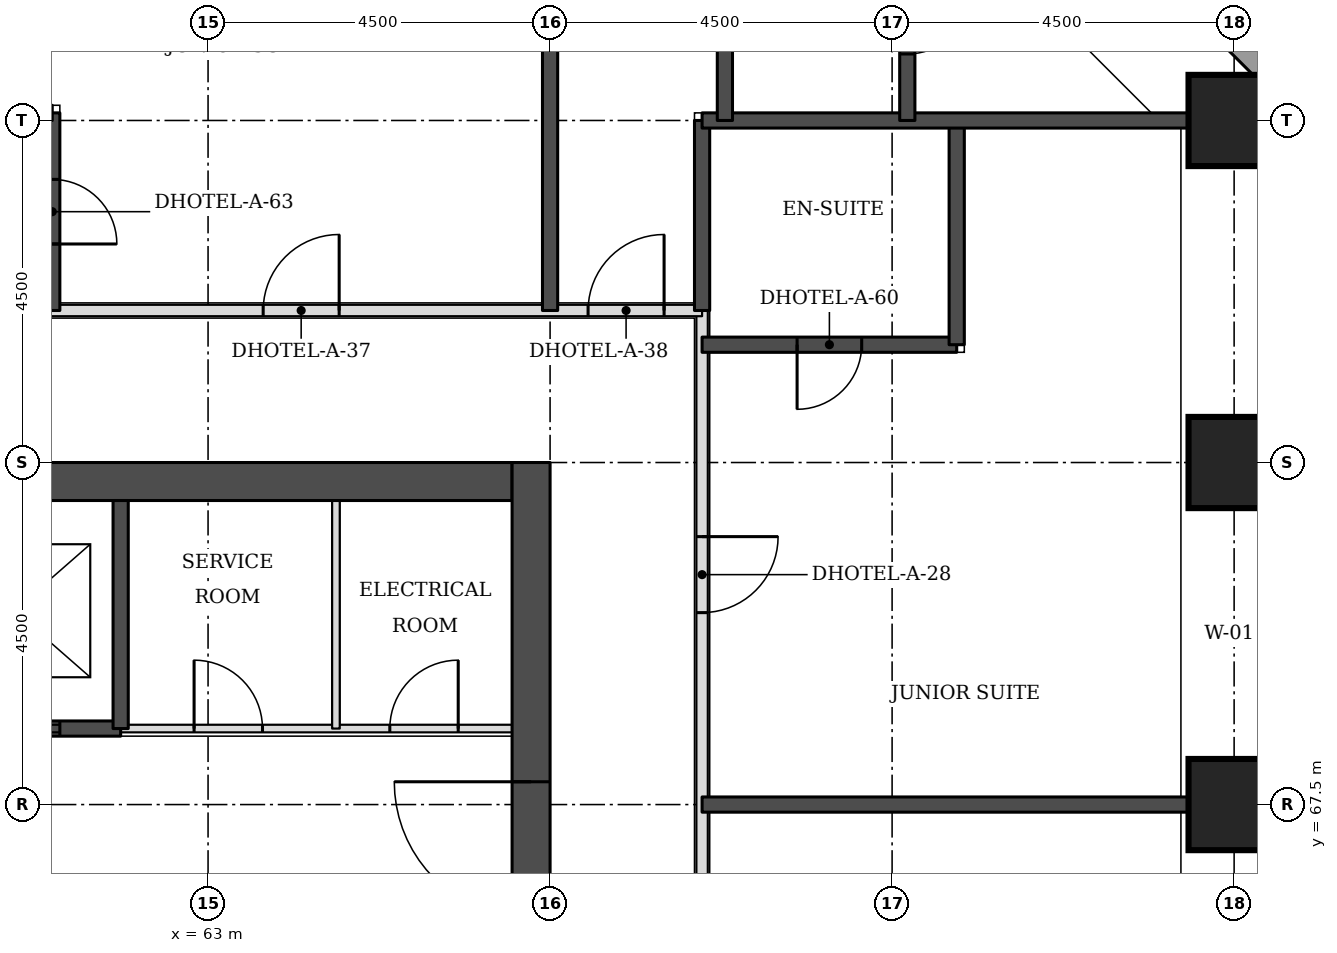
"""IFC4 building model, lengths in metres.
Left out: names, types, materials, properties, quantities, classifications, styles, units other than length and angle.
Written with IfcOpenShell. Run it as: python <this file> out.ifc"""

import sys

from ifc_helpers import new_model, si_unit, direction, frame, frame_2d, origin, origin_2d, place, context, subcontext, project, spatial, rectangle, extrude, element, fill, save


model = new_model("IFC4")
c1 = context("Model", 3, precision=1e-05, world=origin(), true_north=direction((0.0, 1.0)))
c2 = subcontext(c1, "Body", "Model", "MODEL_VIEW")
j1 = project(units=[si_unit("LENGTHUNIT", "METRE"), si_unit("PLANEANGLEUNIT", "RADIAN")], contexts=[c1])
p1 = place(None, origin())
s1 = spatial("IfcSite", under=j1, at=p1, CompositionType="ELEMENT")
p2 = place(p1, origin())
s2 = spatial("IfcBuilding", under=s1, at=p2, CompositionType="ELEMENT")
p3 = place(p2, frame((0.0, 0.0, 26.4)))
s3 = spatial("IfcBuildingStorey", under=s2, at=p3, CompositionType="ELEMENT", Elevation=26.4)
for number, where, z_axis, x_axis in (
    (1, (76.5, 67.5, 0.0), (0.0, 0.0, 1.0), (1.0, 0.0, 0.0)),
    (2, (76.5, 72.0, 0.0), (0.0, 0.0, 1.0), (1.0, 0.0, 0.0)),
    (3, (76.5, 76.5, 0.0), (0.0, 0.0, 1.0), (1.0, 0.0, 0.0)),
):
    element("IfcColumn", number, at=place(p3, frame(where, z_axis=z_axis, x_axis=x_axis)), inside=s3, PredefinedType="COLUMN", context=c2, shape_type="SweptSolid", body=[
        extrude(rectangle(XDim=1.2, YDim=1.2, at=origin_2d()), origin(), (0.0, 0.0, 1.0), 3.3),
    ])
p4 = place(p3, frame((45.5, 71.75, 0.0), z_axis=(0.0, 0.0, 1.0), x_axis=(1.0, 0.0, 0.0)))
e4 = element("IfcWall", 4, at=p4, inside=s3, PredefinedType="SHEAR", context=c2, shape_type="SweptSolid", body=[
    extrude(rectangle(XDim=21.5, YDim=0.5, at=frame_2d((10.75, 0.0))), origin(), (0.0, 0.0, 1.0), 3.3),
])
p5 = place(p3, frame((67.25, 49.5, 0.0), z_axis=(0.0, 0.0, 1.0), x_axis=(0.0, 1.0, 0.0)))
e5 = element("IfcWall", 5, at=p5, inside=s3, PredefinedType="SHEAR", context=c2, shape_type="SweptSolid", body=[
    extrude(rectangle(XDim=22.5, YDim=0.5, at=frame_2d((11.25, 0.0))), origin(), (0.0, 0.0, 1.0), 3.3),
])
p6 = place(p5, frame((4.2, 0.0, 0.0)))
e6 = element("IfcOpeningElement", 6, at=p6, cuts=e5, PredefinedType="OPENING", context=c2, shape_type="SweptSolid", body=[
    extrude(rectangle(XDim=1.8, YDim=2.1, at=frame_2d((0.9, 1.05))), frame((0.0, 0.26, 0.0), z_axis=(0.0, -1.0, 0.0), x_axis=(1.0, 0.0, 0.0)), (0.0, 0.0, 1.0), 0.52),
])
p7 = place(p5, frame((6.9, 0.0, 0.0)))
e7 = element("IfcOpeningElement", 7, at=p7, cuts=e5, PredefinedType="OPENING", context=c2, shape_type="SweptSolid", body=[
    extrude(rectangle(XDim=1.1, YDim=2.1, at=frame_2d((0.55, 1.05))), frame((0.0, 0.26, 0.0), z_axis=(0.0, -1.0, 0.0), x_axis=(1.0, 0.0, 0.0)), (0.0, 0.0, 1.0), 0.52),
])
p8 = place(p5, frame((13.6, 0.0, 0.0)))
e8 = element("IfcOpeningElement", 8, at=p8, cuts=e5, PredefinedType="OPENING", context=c2, shape_type="SweptSolid", body=[
    extrude(rectangle(XDim=1.1, YDim=2.1, at=frame_2d((0.55, 1.05))), frame((0.0, 0.26, 0.0), z_axis=(0.0, -1.0, 0.0), x_axis=(1.0, 0.0, 0.0)), (0.0, 0.0, 1.0), 0.52),
])
p9 = place(p5, frame((16.5, 0.0, 0.0)))
e9 = element("IfcOpeningElement", 9, at=p9, cuts=e5, PredefinedType="OPENING", context=c2, shape_type="SweptSolid", body=[
    extrude(rectangle(XDim=1.8, YDim=2.1, at=frame_2d((0.9, 1.05))), frame((0.0, 0.26, 0.0), z_axis=(0.0, -1.0, 0.0), x_axis=(1.0, 0.0, 0.0)), (0.0, 0.0, 1.0), 0.52),
])
p10 = place(p3, frame((77.326, 76.77, 0.0), z_axis=(0.0, 0.0, 1.0), x_axis=(-0.707106781187, 0.707106781187, 0.0)))
e10 = element("IfcWall", 10, at=p10, inside=s3, PredefinedType="STANDARD", context=c2, shape_type="SweptSolid", body=[
    extrude(rectangle(XDim=7.151, YDim=0.35, at=frame_2d((3.576, 0.0))), origin(), (0.0, 0.0, 1.0), 3.055),
])
p11 = place(p10, frame((1.926, 0.0, 0.8)))
e11 = element("IfcOpeningElement", 11, at=p11, cuts=e10, PredefinedType="OPENING", context=c2, shape_type="SweptSolid", body=[
    extrude(rectangle(XDim=3.3, YDim=1.5, at=frame_2d((1.65, 0.75))), frame((0.0, 0.185, 0.0), z_axis=(0.0, -1.0, 0.0), x_axis=(1.0, 0.0, 0.0)), (0.0, 0.0, 1.0), 0.37),
])
p12 = place(p3, frame((69.5, 47.5, 0.0), z_axis=(0.0, 0.0, 1.0), x_axis=(0.0, 1.0, 0.0)))
e12 = element("IfcWall", 12, at=p12, inside=s3, PredefinedType="PARTITIONING", context=c2, shape_type="SweptSolid", body=[
    extrude(rectangle(XDim=26.5, YDim=0.15, at=frame_2d((13.25, 0.0))), origin(), (0.0, 0.0, 1.0), 3.08),
])
p13 = place(p12, frame((22.525, 0.0, 0.0)))
e13 = element("IfcOpeningElement", 13, at=p13, cuts=e12, PredefinedType="OPENING", context=c2, shape_type="SweptSolid", body=[
    extrude(rectangle(XDim=1.0, YDim=2.1, at=frame_2d((0.5, 1.05))), frame((0.0, 0.085, 0.0), z_axis=(0.0, -1.0, 0.0), x_axis=(1.0, 0.0, 0.0)), (0.0, 0.0, 1.0), 0.17),
])
p14 = place(p12, frame((16.225, 0.0, 0.0)))
e14 = element("IfcOpeningElement", 14, at=p14, cuts=e12, PredefinedType="OPENING", context=c2, shape_type="SweptSolid", body=[
    extrude(rectangle(XDim=1.0, YDim=2.1, at=frame_2d((0.5, 1.05))), frame((0.0, 0.085, 0.0), z_axis=(0.0, -1.0, 0.0), x_axis=(1.0, 0.0, 0.0)), (0.0, 0.0, 1.0), 0.17),
])
p15 = place(p12, frame((4.25, 0.0, 0.0)))
e15 = element("IfcOpeningElement", 15, at=p15, cuts=e12, PredefinedType="OPENING", context=c2, shape_type="SweptSolid", body=[
    extrude(rectangle(XDim=1.1, YDim=2.1, at=frame_2d((0.55, 1.05))), frame((0.0, 0.085, 0.0), z_axis=(0.0, -1.0, 0.0), x_axis=(1.0, 0.0, 0.0)), (0.0, 0.0, 1.0), 0.17),
])
p16 = place(p12, frame((0.447, 0.0, 0.0)))
e16 = element("IfcOpeningElement", 16, at=p16, cuts=e12, PredefinedType="OPENING", context=c2, shape_type="SweptSolid", body=[
    extrude(rectangle(XDim=1.0, YDim=2.1, at=frame_2d((0.5, 1.05))), frame((0.0, 0.085, 0.0), z_axis=(0.0, -1.0, 0.0), x_axis=(1.0, 0.0, 0.0)), (0.0, 0.0, 1.0), 0.17),
])
p17 = place(p3, frame((43.0, 74.0, 0.0), z_axis=(0.0, 0.0, 1.0), x_axis=(1.0, 0.0, 0.0)))
e17 = element("IfcWall", 17, at=p17, inside=s3, PredefinedType="PARTITIONING", context=c2, shape_type="SweptSolid", body=[
    extrude(rectangle(XDim=26.5, YDim=0.15, at=frame_2d((13.25, 0.0))), origin(), (0.0, 0.0, 1.0), 3.08),
])
p18 = place(p17, frame((4.675, 0.0, 0.0)))
e18 = element("IfcOpeningElement", 18, at=p18, cuts=e17, PredefinedType="OPENING", context=c2, shape_type="SweptSolid", body=[
    extrude(rectangle(XDim=1.0, YDim=2.1, at=frame_2d((0.5, 1.05))), frame((0.0, 0.085, 0.0), z_axis=(0.0, -1.0, 0.0), x_axis=(1.0, 0.0, 0.0)), (0.0, 0.0, 1.0), 0.17),
])
p19 = place(p17, frame((9.025, 0.0, 0.0)))
e19 = element("IfcOpeningElement", 19, at=p19, cuts=e17, PredefinedType="OPENING", context=c2, shape_type="SweptSolid", body=[
    extrude(rectangle(XDim=1.0, YDim=2.1, at=frame_2d((0.5, 1.05))), frame((0.0, 0.085, 0.0), z_axis=(0.0, -1.0, 0.0), x_axis=(1.0, 0.0, 0.0)), (0.0, 0.0, 1.0), 0.17),
])
p20 = place(p17, frame((20.725, 0.0, 0.0)))
e20 = element("IfcOpeningElement", 20, at=p20, cuts=e17, PredefinedType="OPENING", context=c2, shape_type="SweptSolid", body=[
    extrude(rectangle(XDim=1.0, YDim=2.1, at=frame_2d((0.5, 1.05))), frame((0.0, 0.085, 0.0), z_axis=(0.0, -1.0, 0.0), x_axis=(1.0, 0.0, 0.0)), (0.0, 0.0, 1.0), 0.17),
])
p21 = place(p17, frame((0.5, 0.0, 0.0)))
e21 = element("IfcOpeningElement", 21, at=p21, cuts=e17, PredefinedType="OPENING", context=c2, shape_type="SweptSolid", body=[
    extrude(rectangle(XDim=1.0, YDim=2.1, at=frame_2d((0.5, 1.05))), frame((0.0, 0.085, 0.0), z_axis=(0.0, -1.0, 0.0), x_axis=(1.0, 0.0, 0.0)), (0.0, 0.0, 1.0), 0.17),
])
p22 = place(p17, frame((25.0, 0.0, 0.0)))
e22 = element("IfcOpeningElement", 22, at=p22, cuts=e17, PredefinedType="OPENING", context=c2, shape_type="SweptSolid", body=[
    extrude(rectangle(XDim=1.0, YDim=2.1, at=frame_2d((0.5, 1.05))), frame((0.0, 0.085, 0.0), z_axis=(0.0, -1.0, 0.0), x_axis=(1.0, 0.0, 0.0)), (0.0, 0.0, 1.0), 0.17),
])
p23 = place(p3, frame((69.5, 67.5, 0.0), z_axis=(0.0, 0.0, 1.0), x_axis=(1.0, 0.0, 0.0)))
e23 = element("IfcWall", 23, at=p23, inside=s3, PredefinedType="SOLIDWALL", context=c2, shape_type="SweptSolid", body=[
    extrude(rectangle(XDim=6.4, YDim=0.2, at=frame_2d((3.2, 0.0))), origin(), (0.0, 0.0, 1.0), 3.08),
])
p24 = place(p3, frame((69.5, 73.55, 0.0), z_axis=(0.0, 0.0, 1.0), x_axis=(1.0, 0.0, 0.0)))
e24 = element("IfcWall", 24, at=p24, inside=s3, PredefinedType="SOLIDWALL", context=c2, shape_type="SweptSolid", body=[
    extrude(rectangle(XDim=3.35, YDim=0.2, at=frame_2d((1.675, 0.0))), origin(), (0.0, 0.0, 1.0), 3.08),
])
p25 = place(p24, frame((1.25, 0.0, 0.0)))
e25 = element("IfcOpeningElement", 25, at=p25, cuts=e24, PredefinedType="OPENING", context=c2, shape_type="SweptSolid", body=[
    extrude(rectangle(XDim=0.85, YDim=2.1, at=frame_2d((0.425, 1.05))), frame((0.0, 0.11, 0.0), z_axis=(0.0, -1.0, 0.0), x_axis=(1.0, 0.0, 0.0)), (0.0, 0.0, 1.0), 0.22),
])
p26 = place(p3, frame((72.85, 73.55, 0.0), z_axis=(0.0, 0.0, 1.0), x_axis=(0.0, 1.0, 0.0)))
e26 = element("IfcWall", 26, at=p26, inside=s3, PredefinedType="SOLIDWALL", context=c2, shape_type="SweptSolid", body=[
    extrude(rectangle(XDim=2.95, YDim=0.2, at=frame_2d((1.475, 0.0))), origin(), (0.0, 0.0, 1.0), 3.08),
])
p27 = place(p3, frame((60.95, 74.0, 0.0), z_axis=(0.0, 0.0, 1.0), x_axis=(0.0, 1.0, 0.0)))
e27 = element("IfcWall", 27, at=p27, inside=s3, PredefinedType="SOLIDWALL", context=c2, shape_type="SweptSolid", body=[
    extrude(rectangle(XDim=2.6, YDim=0.2, at=frame_2d((1.3, 0.0))), origin(), (0.0, 0.0, 1.0), 3.08),
])
p28 = place(p27, frame((0.875, 0.0, 0.0)))
e28 = element("IfcOpeningElement", 28, at=p28, cuts=e27, PredefinedType="OPENING", context=c2, shape_type="SweptSolid", body=[
    extrude(rectangle(XDim=0.85, YDim=2.1, at=frame_2d((0.425, 1.05))), frame((0.0, 0.11, 0.0), z_axis=(0.0, -1.0, 0.0), x_axis=(1.0, 0.0, 0.0)), (0.0, 0.0, 1.0), 0.22),
])
p29 = place(p3, frame((67.5, 74.0, 0.0), z_axis=(0.0, 0.0, 1.0), x_axis=(0.0, 1.0, 0.0)))
e29 = element("IfcWall", 29, at=p29, inside=s3, PredefinedType="SOLIDWALL", context=c2, shape_type="SweptSolid", body=[
    extrude(rectangle(XDim=6.4, YDim=0.2, at=frame_2d((3.2, 0.0))), origin(), (0.0, 0.0, 1.0), 3.08),
])
p30 = place(p3, frame((69.5, 74.0, 0.0), z_axis=(0.0, 0.0, 1.0), x_axis=(0.0, 1.0, 0.0)))
e30 = element("IfcWall", 30, at=p30, inside=s3, PredefinedType="SOLIDWALL", context=c2, shape_type="SweptSolid", body=[
    extrude(rectangle(XDim=2.5, YDim=0.2, at=frame_2d((1.25, 0.0))), origin(), (0.0, 0.0, 1.0), 3.08),
])
p31 = place(p3, frame((69.5, 76.5, 0.0), z_axis=(0.0, 0.0, 1.0), x_axis=(1.0, 0.0, 0.0)))
e31 = element("IfcWall", 31, at=p31, inside=s3, PredefinedType="SOLIDWALL", context=c2, shape_type="SweptSolid", body=[
    extrude(rectangle(XDim=6.4, YDim=0.2, at=frame_2d((3.2, 0.0))), origin(), (0.0, 0.0, 1.0), 3.08),
])
p32 = place(p3, frame((69.8, 76.5, 0.0), z_axis=(0.0, 0.0, 1.0), x_axis=(0.0, 1.0, 0.0)))
e32 = element("IfcWall", 32, at=p32, inside=s3, PredefinedType="SOLIDWALL", context=c2, shape_type="SweptSolid", body=[
    extrude(rectangle(XDim=2.5, YDim=0.2, at=frame_2d((1.25, 0.0))), origin(), (0.0, 0.0, 1.0), 3.08),
])
p33 = place(p3, frame((72.2, 76.5, 0.0), z_axis=(0.0, 0.0, 1.0), x_axis=(0.0, 1.0, 0.0)))
e33 = element("IfcWall", 33, at=p33, inside=s3, PredefinedType="SOLIDWALL", context=c2, shape_type="SweptSolid", body=[
    extrude(rectangle(XDim=2.5, YDim=0.2, at=frame_2d((1.25, 0.0))), origin(), (0.0, 0.0, 1.0), 3.08),
])
p34 = place(p33, frame((0.875, 0.0, 0.0)))
e34 = element("IfcOpeningElement", 34, at=p34, cuts=e33, PredefinedType="OPENING", context=c2, shape_type="SweptSolid", body=[
    extrude(rectangle(XDim=0.85, YDim=2.1, at=frame_2d((0.425, 1.05))), frame((0.0, 0.11, 0.0), z_axis=(0.0, -1.0, 0.0), x_axis=(1.0, 0.0, 0.0)), (0.0, 0.0, 1.0), 0.22),
])
p35 = place(p3, frame((58.5, 76.6, 0.0), z_axis=(0.0, 0.0, 1.0), x_axis=(1.0, 0.0, 0.0)))
e35 = element("IfcWall", 35, at=p35, inside=s3, PredefinedType="SOLIDWALL", context=c2, shape_type="SweptSolid", body=[
    extrude(rectangle(XDim=2.45, YDim=0.2, at=frame_2d((1.225, 0.0))), origin(), (0.0, 0.0, 1.0), 3.08),
])
p36 = place(p3, frame((61.85, 68.5, 0.0), z_axis=(0.0, 0.0, 1.0), x_axis=(1.0, 0.0, 0.0)))
e36 = element("IfcWall", 36, at=p36, inside=s3, PredefinedType="PARTITIONING", context=c2, shape_type="SweptSolid", body=[
    extrude(rectangle(XDim=5.15, YDim=0.1, at=frame_2d((2.575, 0.0))), origin(), (0.0, 0.0, 1.0), 3.08),
])
p37 = place(p36, frame((3.541, 0.0, 0.0)))
e37 = element("IfcOpeningElement", 37, at=p37, cuts=e36, PredefinedType="OPENING", context=c2, shape_type="SweptSolid", body=[
    extrude(rectangle(XDim=0.9, YDim=2.1, at=frame_2d((0.45, 1.05))), frame((0.0, 0.06, 0.0), z_axis=(0.0, -1.0, 0.0), x_axis=(1.0, 0.0, 0.0)), (0.0, 0.0, 1.0), 0.12),
])
p38 = place(p36, frame((0.966, 0.0, 0.0)))
e38 = element("IfcOpeningElement", 38, at=p38, cuts=e36, PredefinedType="OPENING", context=c2, shape_type="SweptSolid", body=[
    extrude(rectangle(XDim=0.9, YDim=2.1, at=frame_2d((0.45, 1.05))), frame((0.0, 0.06, 0.0), z_axis=(0.0, -1.0, 0.0), x_axis=(1.0, 0.0, 0.0)), (0.0, 0.0, 1.0), 0.12),
])
p39 = place(p3, frame((50.65, 68.5, 0.0), z_axis=(0.0, 0.0, 1.0), x_axis=(1.0, 0.0, 0.0)))
e39 = element("IfcWall", 39, at=p39, inside=s3, PredefinedType="SOLIDWALL", context=c2, shape_type="SweptSolid", body=[
    extrude(rectangle(XDim=11.2, YDim=0.2, at=frame_2d((5.6, 0.0))), origin(), (0.0, 0.0, 1.0), 3.08),
])
p40 = place(p39, frame((0.8, 0.0, 0.0)))
e40 = element("IfcOpeningElement", 40, at=p40, cuts=e39, PredefinedType="OPENING", context=c2, shape_type="SweptSolid", body=[
    extrude(rectangle(XDim=1.2, YDim=2.1, at=frame_2d((0.6, 1.05))), frame((0.0, 0.11, 0.0), z_axis=(0.0, -1.0, 0.0), x_axis=(1.0, 0.0, 0.0)), (0.0, 0.0, 1.0), 0.22),
])
p41 = place(p39, frame((3.6, 0.0, 0.0)))
e41 = element("IfcOpeningElement", 41, at=p41, cuts=e39, PredefinedType="OPENING", context=c2, shape_type="SweptSolid", body=[
    extrude(rectangle(XDim=1.2, YDim=2.1, at=frame_2d((0.6, 1.05))), frame((0.0, 0.11, 0.0), z_axis=(0.0, -1.0, 0.0), x_axis=(1.0, 0.0, 0.0)), (0.0, 0.0, 1.0), 0.22),
])
p42 = place(p39, frame((6.4, 0.0, 0.0)))
e42 = element("IfcOpeningElement", 42, at=p42, cuts=e39, PredefinedType="OPENING", context=c2, shape_type="SweptSolid", body=[
    extrude(rectangle(XDim=1.2, YDim=2.1, at=frame_2d((0.6, 1.05))), frame((0.0, 0.11, 0.0), z_axis=(0.0, -1.0, 0.0), x_axis=(1.0, 0.0, 0.0)), (0.0, 0.0, 1.0), 0.22),
])
p43 = place(p39, frame((9.2, 0.0, 0.0)))
e43 = element("IfcOpeningElement", 43, at=p43, cuts=e39, PredefinedType="OPENING", context=c2, shape_type="SweptSolid", body=[
    extrude(rectangle(XDim=1.2, YDim=2.1, at=frame_2d((0.6, 1.05))), frame((0.0, 0.11, 0.0), z_axis=(0.0, -1.0, 0.0), x_axis=(1.0, 0.0, 0.0)), (0.0, 0.0, 1.0), 0.22),
])
p44 = place(p3, frame((61.85, 68.5, 0.0), z_axis=(0.0, 0.0, 1.0), x_axis=(0.0, 1.0, 0.0)))
e44 = element("IfcWall", 44, at=p44, inside=s3, PredefinedType="SOLIDWALL", context=c2, shape_type="SweptSolid", body=[
    extrude(rectangle(XDim=3.0, YDim=0.2, at=frame_2d((1.5, 0.0))), origin(), (0.0, 0.0, 1.0), 3.08),
])
p45 = place(p3, frame((64.683, 68.5, 0.0), z_axis=(0.0, 0.0, 1.0), x_axis=(0.0, 1.0, 0.0)))
e45 = element("IfcWall", 45, at=p45, inside=s3, PredefinedType="PARTITIONING", context=c2, shape_type="SweptSolid", body=[
    extrude(rectangle(XDim=3.0, YDim=0.1, at=frame_2d((1.5, 0.0))), origin(), (0.0, 0.0, 1.0), 3.08),
])
p46 = place(p20, origin())
e46 = element("IfcDoor", 46, at=p46, inside=s3, OperationType="SINGLE_SWING_RIGHT", PredefinedType="DOOR", context=c2, shape_type="SweptSolid", body=[
    extrude(rectangle(XDim=1.0, YDim=2.1, at=frame_2d((0.5, 1.05))), frame((0.0, 0.025, 0.0), z_axis=(0.0, -1.0, 0.0), x_axis=(1.0, 0.0, 0.0)), (0.0, 0.0, 1.0), 0.05),
])
fill(e20, e46)
p47 = place(p28, frame((0.85, 0.0, 0.0), z_axis=(0.0, 0.0, 1.0), x_axis=(-1.0, 0.0, 0.0)))
e47 = element("IfcDoor", 47, at=p47, inside=s3, OperationType="SINGLE_SWING_RIGHT", PredefinedType="DOOR", context=c2, shape_type="SweptSolid", body=[
    extrude(rectangle(XDim=0.85, YDim=2.1, at=frame_2d((0.425, 1.05))), frame((0.0, 0.025, 0.0), z_axis=(0.0, -1.0, 0.0), x_axis=(1.0, 0.0, 0.0)), (0.0, 0.0, 1.0), 0.05),
])
fill(e28, e47)
p48 = place(p13, frame((1.0, 0.0, 0.0), z_axis=(0.0, 0.0, 1.0), x_axis=(-1.0, 0.0, 0.0)))
e48 = element("IfcDoor", 48, at=p48, inside=s3, OperationType="SINGLE_SWING_LEFT", PredefinedType="DOOR", context=c2, shape_type="SweptSolid", body=[
    extrude(rectangle(XDim=1.0, YDim=2.1, at=frame_2d((0.5, 1.05))), frame((0.0, 0.025, 0.0), z_axis=(0.0, -1.0, 0.0), x_axis=(1.0, 0.0, 0.0)), (0.0, 0.0, 1.0), 0.05),
])
fill(e13, e48)
p49 = place(p25, frame((0.85, 0.0, 0.0), z_axis=(0.0, 0.0, 1.0), x_axis=(-1.0, 0.0, 0.0)))
e49 = element("IfcDoor", 49, at=p49, inside=s3, OperationType="SINGLE_SWING_RIGHT", PredefinedType="DOOR", context=c2, shape_type="SweptSolid", body=[
    extrude(rectangle(XDim=0.85, YDim=2.1, at=frame_2d((0.425, 1.05))), frame((0.0, 0.025, 0.0), z_axis=(0.0, -1.0, 0.0), x_axis=(1.0, 0.0, 0.0)), (0.0, 0.0, 1.0), 0.05),
])
fill(e25, e49)
p50 = place(p22, origin())
e50 = element("IfcDoor", 50, at=p50, inside=s3, OperationType="SINGLE_SWING_RIGHT", PredefinedType="DOOR", context=c2, shape_type="SweptSolid", body=[
    extrude(rectangle(XDim=1.0, YDim=2.1, at=frame_2d((0.5, 1.05))), frame((0.0, 0.025, 0.0), z_axis=(0.0, -1.0, 0.0), x_axis=(1.0, 0.0, 0.0)), (0.0, 0.0, 1.0), 0.05),
])
fill(e22, e50)
p51 = place(p34, frame((0.85, 0.0, 0.0), z_axis=(0.0, 0.0, 1.0), x_axis=(-1.0, 0.0, 0.0)))
e51 = element("IfcDoor", 51, at=p51, inside=s3, OperationType="SINGLE_SWING_LEFT", PredefinedType="DOOR", context=c2, shape_type="SweptSolid", body=[
    extrude(rectangle(XDim=0.85, YDim=2.1, at=frame_2d((0.425, 1.05))), frame((0.0, 0.025, 0.0), z_axis=(0.0, -1.0, 0.0), x_axis=(1.0, 0.0, 0.0)), (0.0, 0.0, 1.0), 0.05),
])
fill(e34, e51)
p52 = place(p43, origin())
e52 = element("IfcDoor", 52, at=p52, inside=s3, OperationType="DOUBLE_DOOR_SLIDING", PredefinedType="DOOR", context=c2, shape_type="SweptSolid", body=[
    extrude(rectangle(XDim=1.2, YDim=2.1, at=frame_2d((0.6, 1.05))), frame((0.0, 0.025, 0.0), z_axis=(0.0, -1.0, 0.0), x_axis=(1.0, 0.0, 0.0)), (0.0, 0.0, 1.0), 0.05),
])
fill(e43, e52)
p53 = place(p9, origin())
e53 = element("IfcDoor", 53, at=p53, inside=s3, OperationType="SINGLE_SWING_RIGHT", PredefinedType="DOOR", context=c2, shape_type="SweptSolid", body=[
    extrude(rectangle(XDim=1.8, YDim=2.1, at=frame_2d((0.9, 1.05))), frame((0.0, 0.025, 0.0), z_axis=(0.0, -1.0, 0.0), x_axis=(1.0, 0.0, 0.0)), (0.0, 0.0, 1.0), 0.05),
])
fill(e9, e53)
p54 = place(p37, origin())
e54 = element("IfcDoor", 54, at=p54, inside=s3, OperationType="SINGLE_SWING_RIGHT", PredefinedType="DOOR", context=c2, shape_type="SweptSolid", body=[
    extrude(rectangle(XDim=0.9, YDim=2.1, at=frame_2d((0.45, 1.05))), frame((0.0, 0.025, 0.0), z_axis=(0.0, -1.0, 0.0), x_axis=(1.0, 0.0, 0.0)), (0.0, 0.0, 1.0), 0.05),
])
fill(e37, e54)
p55 = place(p38, origin())
e55 = element("IfcDoor", 55, at=p55, inside=s3, OperationType="SINGLE_SWING_LEFT", PredefinedType="DOOR", context=c2, shape_type="SweptSolid", body=[
    extrude(rectangle(XDim=0.9, YDim=2.1, at=frame_2d((0.45, 1.05))), frame((0.0, 0.025, 0.0), z_axis=(0.0, -1.0, 0.0), x_axis=(1.0, 0.0, 0.0)), (0.0, 0.0, 1.0), 0.05),
])
fill(e38, e55)
save(model, sys.argv[1])
